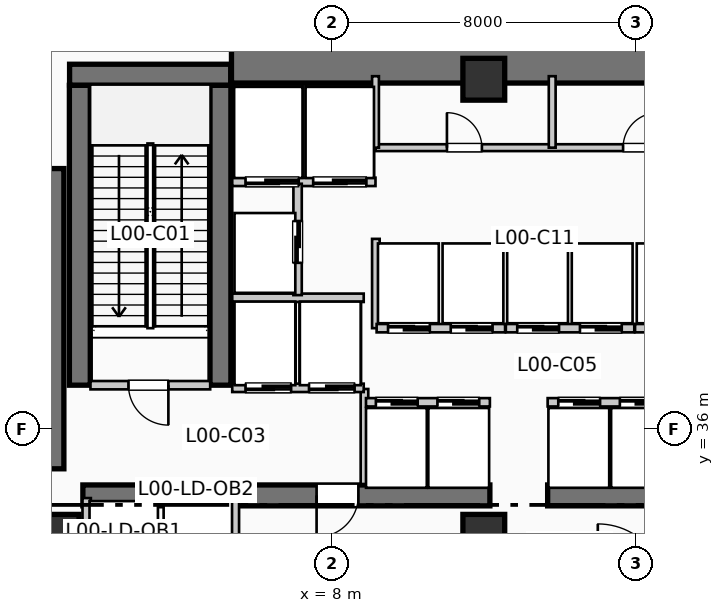
"""IFC4 building model, lengths in metres.
Left out: names, types, materials, properties, quantities, classifications, styles, units other than length and angle.
Written with IfcOpenShell. Run it as: python <this file> out.ifc"""

import sys

from ifc_helpers import new_model, si_unit, direction, frame, frame_2d, origin, origin_2d, place, context, subcontext, project, spatial, rectangle, extrude, element, fill, save


model = new_model("IFC4")
c1 = context("Model", 3, precision=1e-05, world=origin(), true_north=direction((0.0, 1.0)))
c2 = subcontext(c1, "Body", "Model", "MODEL_VIEW")
j1 = project(units=[si_unit("LENGTHUNIT", "METRE"), si_unit("PLANEANGLEUNIT", "RADIAN")], contexts=[c1])
p1 = place(None, origin())
s1 = spatial("IfcSite", under=j1, at=p1, CompositionType="ELEMENT")
p2 = place(p1, origin())
s2 = spatial("IfcBuilding", under=s1, at=p2, CompositionType="ELEMENT")
p3 = place(p2, origin())
s3 = spatial("IfcBuildingStorey", under=s2, at=p3, CompositionType="ELEMENT", Elevation=0.0)
p4 = place(p3, frame((5.36, 45.55, 0.0), z_axis=(0.0, 0.0, 1.0), x_axis=(1.0, 0.0, 0.0)))
e1 = element("IfcWall", 1, at=p4, inside=s3, PredefinedType="SHEAR", context=c2, shape_type="SweptSolid", body=[
    extrude(rectangle(XDim=13.98, YDim=0.9, at=frame_2d((6.99, 0.0))), origin(), (0.0, 0.0, 1.0), 5.94),
])
p5 = place(p3, frame((0.5, 34.95, 0.0), z_axis=(0.0, 0.0, 1.0), x_axis=(0.0, 1.0, 0.0)))
e2 = element("IfcWall", 2, at=p5, inside=s3, PredefinedType="SHEAR", context=c2, shape_type="SweptSolid", body=[
    extrude(rectangle(XDim=7.9, YDim=0.9, at=frame_2d((3.95, 0.0))), origin(), (0.0, 0.0, 1.0), 5.94),
])
p6 = place(p3, frame((1.45, 34.25, 0.0), z_axis=(0.0, 0.0, 1.0), x_axis=(1.0, 0.0, 0.0)))
e3 = element("IfcWall", 3, at=p6, inside=s3, PredefinedType="SHEAR", context=c2, shape_type="SweptSolid", body=[
    extrude(rectangle(XDim=10.71, YDim=0.55, at=frame_2d((5.355, 0.0))), origin(), (0.0, 0.0, 1.0), 5.94),
])
p7 = place(p6, frame((7.25, 0.0, 0.0), z_axis=(0.0, 0.0, 1.0), x_axis=(-1.0, 0.0, 0.0)))
e4 = element("IfcOpeningElement", 4, at=p7, cuts=e3, PredefinedType="OPENING", context=c2, shape_type="SweptSolid", body=[
    extrude(rectangle(XDim=1.1, YDim=2.15, at=frame_2d((0.55, 1.075))), frame((0.0, 0.285, 0.0), z_axis=(0.0, -1.0, 0.0), x_axis=(1.0, 0.0, 0.0)), (0.0, 0.0, 1.0), 0.57),
])
p8 = place(p3, frame((13.68, 34.25, 0.0), z_axis=(0.0, 0.0, 1.0), x_axis=(1.0, 0.0, 0.0)))
e5 = element("IfcWall", 5, at=p8, inside=s3, PredefinedType="SHEAR", context=c2, shape_type="SweptSolid", body=[
    extrude(rectangle(XDim=6.12, YDim=0.55, at=frame_2d((3.06, 0.0))), origin(), (0.0, 0.0, 1.0), 5.94),
])
for number, where, z_axis, x_axis in (
    (6, (1.37, 37.15, 0.0), (0.0, 0.0, 1.0), (0.0, 1.0, 0.0)),
    (7, (5.07, 37.15, 0.0), (0.0, 0.0, 1.0), (0.0, 1.0, 0.0)),
):
    element("IfcWall", number, at=place(p3, frame(where, z_axis=z_axis, x_axis=x_axis)), inside=s3, PredefinedType="SHEAR", context=c2, shape_type="SweptSolid", body=[
        extrude(rectangle(XDim=7.89, YDim=0.55, at=frame_2d((3.945, 0.0))), origin(), (0.0, 0.0, 1.0), 5.94),
    ])
p9 = place(p3, frame((1.1, 45.32, 0.0), z_axis=(0.0, 0.0, 1.0), x_axis=(1.0, 0.0, 0.0)))
e8 = element("IfcWall", 8, at=p9, inside=s3, PredefinedType="SHEAR", context=c2, shape_type="SweptSolid", body=[
    extrude(rectangle(XDim=4.24, YDim=0.55, at=frame_2d((2.12, 0.0))), origin(), (0.0, 0.0, 1.0), 5.94),
])
for number, where, z_axis, x_axis in (
    (9, (0.8, 33.2, 0.0), (0.0, 0.0, 1.0), (1.0, 0.0, 0.0)),
    (10, (12.0, 33.2, 0.0), (0.0, 0.0, 1.0), (1.0, 0.0, 0.0)),
    (11, (12.0, 45.2, 0.0), (0.0, 0.0, 1.0), (1.0, 0.0, 0.0)),
):
    element("IfcColumn", number, at=place(p3, frame(where, z_axis=z_axis, x_axis=x_axis)), inside=s3, PredefinedType="COLUMN", context=c2, shape_type="SweptSolid", body=[
        extrude(rectangle(XDim=1.1, YDim=1.1, at=origin_2d()), origin(), (0.0, 0.0, 1.0), 5.94),
    ])
p10 = place(p3, frame((1.088, 47.834, 0.0), z_axis=(0.0, 0.0, 1.0), x_axis=(-0.707106781187, -0.707106781187, 0.0)))
e12 = element("IfcWall", 12, at=p10, inside=s3, PredefinedType="SOLIDWALL", context=c2, shape_type="SweptSolid", body=[
    extrude(rectangle(XDim=4.133, YDim=0.36, at=frame_2d((2.066, 0.0))), origin(), (0.0, 0.0, 1.0), 5.62),
])
p11 = place(p3, frame((1.65, 37.15, 0.0), z_axis=(0.0, 0.0, 1.0), x_axis=(1.0, 0.0, 0.0)))
e13 = element("IfcWall", 13, at=p11, inside=s3, PredefinedType="PARTITIONING", context=c2, shape_type="SweptSolid", body=[
    extrude(rectangle(XDim=3.15, YDim=0.22, at=frame_2d((1.575, 0.0))), origin(), (0.0, 0.0, 1.0), 5.62),
])
p12 = place(p11, frame((2.05, 0.0, 0.0), z_axis=(0.0, 0.0, 1.0), x_axis=(-1.0, 0.0, 0.0)))
e14 = element("IfcOpeningElement", 14, at=p12, cuts=e13, PredefinedType="OPENING", context=c2, shape_type="SweptSolid", body=[
    extrude(rectangle(XDim=1.05, YDim=2.15, at=frame_2d((0.525, 1.075))), frame((0.0, 0.12, 0.0), z_axis=(0.0, -1.0, 0.0), x_axis=(1.0, 0.0, 0.0)), (0.0, 0.0, 1.0), 0.24),
])
p13 = place(p3, frame((8.86, 34.55, 0.0), z_axis=(0.0, 0.0, 1.0), x_axis=(0.0, 1.0, 0.0)))
e15 = element("IfcWall", 15, at=p13, inside=s3, PredefinedType="PARTITIONING", context=c2, shape_type="SweptSolid", body=[
    extrude(rectangle(XDim=2.5, YDim=0.2, at=frame_2d((1.25, 0.0))), origin(), (0.0, 0.0, 1.0), 5.62),
])
p14 = place(p3, frame((5.38, 37.08, 0.0), z_axis=(0.0, 0.0, 1.0), x_axis=(1.0, 0.0, 0.0)))
e16 = element("IfcWall", 16, at=p14, inside=s3, PredefinedType="PARTITIONING", context=c2, shape_type="SweptSolid", body=[
    extrude(rectangle(XDim=3.46, YDim=0.22, at=frame_2d((1.73, 0.0))), origin(), (0.0, 0.0, 1.0), 5.62),
])
p15 = place(p14, frame((1.55, 0.0, 0.0), z_axis=(0.0, 0.0, 1.0), x_axis=(-1.0, 0.0, 0.0)))
e17 = element("IfcOpeningElement", 17, at=p15, cuts=e16, PredefinedType="OPENING", context=c2, shape_type="SweptSolid", body=[
    extrude(rectangle(XDim=1.2, YDim=2.2, at=frame_2d((0.6, 1.1))), frame((0.0, 0.12, 0.0), z_axis=(0.0, -1.0, 0.0), x_axis=(1.0, 0.0, 0.0)), (0.0, 0.0, 1.0), 0.24),
])
p16 = place(p14, frame((3.22, 0.0, 0.0), z_axis=(0.0, 0.0, 1.0), x_axis=(-1.0, 0.0, 0.0)))
e18 = element("IfcOpeningElement", 18, at=p16, cuts=e16, PredefinedType="OPENING", context=c2, shape_type="SweptSolid", body=[
    extrude(rectangle(XDim=1.2, YDim=2.2, at=frame_2d((0.6, 1.1))), frame((0.0, 0.12, 0.0), z_axis=(0.0, -1.0, 0.0), x_axis=(1.0, 0.0, 0.0)), (0.0, 0.0, 1.0), 0.24),
])
p17 = place(p3, frame((5.38, 39.45, 0.0), z_axis=(0.0, 0.0, 1.0), x_axis=(1.0, 0.0, 0.0)))
e19 = element("IfcWall", 19, at=p17, inside=s3, PredefinedType="PARTITIONING", context=c2, shape_type="SweptSolid", body=[
    extrude(rectangle(XDim=3.46, YDim=0.22, at=frame_2d((1.73, 0.0))), origin(), (0.0, 0.0, 1.0), 5.62),
])
p18 = place(p3, frame((5.38, 42.5, 0.0), z_axis=(0.0, 0.0, 1.0), x_axis=(1.0, 0.0, 0.0)))
e20 = element("IfcWall", 20, at=p18, inside=s3, PredefinedType="PARTITIONING", context=c2, shape_type="SweptSolid", body=[
    extrude(rectangle(XDim=3.77, YDim=0.22, at=frame_2d((1.885, 0.0))), origin(), (0.0, 0.0, 1.0), 5.62),
])
p19 = place(p18, frame((1.75, 0.0, 0.0), z_axis=(0.0, 0.0, 1.0), x_axis=(-1.0, 0.0, 0.0)))
e21 = element("IfcOpeningElement", 21, at=p19, cuts=e20, PredefinedType="OPENING", context=c2, shape_type="SweptSolid", body=[
    extrude(rectangle(XDim=1.4, YDim=2.2, at=frame_2d((0.7, 1.1))), frame((0.0, 0.12, 0.0), z_axis=(0.0, -1.0, 0.0), x_axis=(1.0, 0.0, 0.0)), (0.0, 0.0, 1.0), 0.24),
])
p20 = place(p18, frame((3.53, 0.0, 0.0), z_axis=(0.0, 0.0, 1.0), x_axis=(-1.0, 0.0, 0.0)))
e22 = element("IfcOpeningElement", 22, at=p20, cuts=e20, PredefinedType="OPENING", context=c2, shape_type="SweptSolid", body=[
    extrude(rectangle(XDim=1.4, YDim=2.2, at=frame_2d((0.7, 1.1))), frame((0.0, 0.12, 0.0), z_axis=(0.0, -1.0, 0.0), x_axis=(1.0, 0.0, 0.0)), (0.0, 0.0, 1.0), 0.24),
])
p21 = place(p3, frame((7.1, 39.52, 0.0), z_axis=(0.0, 0.0, 1.0), x_axis=(0.0, 1.0, 0.0)))
e23 = element("IfcWall", 23, at=p21, inside=s3, PredefinedType="PARTITIONING", context=c2, shape_type="SweptSolid", body=[
    extrude(rectangle(XDim=2.93, YDim=0.22, at=frame_2d((1.465, 0.0))), origin(), (0.0, 0.0, 1.0), 5.62),
])
p22 = place(p21, frame((0.85, 0.0, 0.0)))
e24 = element("IfcOpeningElement", 24, at=p22, cuts=e23, PredefinedType="OPENING", context=c2, shape_type="SweptSolid", body=[
    extrude(rectangle(XDim=1.1, YDim=2.2, at=frame_2d((0.55, 1.1))), frame((0.0, 0.12, 0.0), z_axis=(0.0, -1.0, 0.0), x_axis=(1.0, 0.0, 0.0)), (0.0, 0.0, 1.0), 0.24),
])
for number, where, z_axis, x_axis in (
    (25, (1.55, 31.8, 0.0), (0.0, 0.0, 1.0), (0.0, 1.0, 0.0)),
    (26, (5.45, 31.8, 0.0), (0.0, 0.0, 1.0), (0.0, 1.0, 0.0)),
):
    element("IfcWall", number, at=place(p3, frame(where, z_axis=z_axis, x_axis=x_axis)), inside=s3, PredefinedType="PARTITIONING", context=c2, shape_type="SweptSolid", body=[
        extrude(rectangle(XDim=2.38, YDim=0.22, at=frame_2d((1.19, 0.0))), origin(), (0.0, 0.0, 1.0), 5.62),
    ])
p23 = place(p3, frame((9.16, 38.65, 0.0), z_axis=(0.0, 0.0, 1.0), x_axis=(0.0, 1.0, 0.0)))
e27 = element("IfcWall", 27, at=p23, inside=s3, PredefinedType="PARTITIONING", context=c2, shape_type="SweptSolid", body=[
    extrude(rectangle(XDim=2.35, YDim=0.2, at=frame_2d((1.175, 0.0))), origin(), (0.0, 0.0, 1.0), 5.62),
])
p24 = place(p3, frame((8.9, 36.7, 0.0), z_axis=(0.0, 0.0, 1.0), x_axis=(1.0, 0.0, 0.0)))
e28 = element("IfcWall", 28, at=p24, inside=s3, PredefinedType="PARTITIONING", context=c2, shape_type="SweptSolid", body=[
    extrude(rectangle(XDim=3.26, YDim=0.22, at=frame_2d((1.63, 0.0))), origin(), (0.0, 0.0, 1.0), 5.62),
])
p25 = place(p24, frame((0.26, 0.0, 0.0)))
e29 = element("IfcOpeningElement", 29, at=p25, cuts=e28, PredefinedType="OPENING", context=c2, shape_type="SweptSolid", body=[
    extrude(rectangle(XDim=1.1, YDim=2.2, at=frame_2d((0.55, 1.1))), frame((0.0, 0.12, 0.0), z_axis=(0.0, -1.0, 0.0), x_axis=(1.0, 0.0, 0.0)), (0.0, 0.0, 1.0), 0.24),
])
p26 = place(p24, frame((1.88, 0.0, 0.0)))
e30 = element("IfcOpeningElement", 30, at=p26, cuts=e28, PredefinedType="OPENING", context=c2, shape_type="SweptSolid", body=[
    extrude(rectangle(XDim=1.1, YDim=2.2, at=frame_2d((0.55, 1.1))), frame((0.0, 0.12, 0.0), z_axis=(0.0, -1.0, 0.0), x_axis=(1.0, 0.0, 0.0)), (0.0, 0.0, 1.0), 0.24),
])
p27 = place(p3, frame((9.18, 38.65, 0.0), z_axis=(0.0, 0.0, 1.0), x_axis=(1.0, 0.0, 0.0)))
e31 = element("IfcWall", 31, at=p27, inside=s3, PredefinedType="PARTITIONING", context=c2, shape_type="SweptSolid", body=[
    extrude(rectangle(XDim=3.38, YDim=0.22, at=frame_2d((1.69, 0.0))), origin(), (0.0, 0.0, 1.0), 5.62),
])
p28 = place(p27, frame((0.3, 0.0, 0.0)))
e32 = element("IfcOpeningElement", 32, at=p28, cuts=e31, PredefinedType="OPENING", context=c2, shape_type="SweptSolid", body=[
    extrude(rectangle(XDim=1.1, YDim=2.2, at=frame_2d((0.55, 1.1))), frame((0.0, 0.12, 0.0), z_axis=(0.0, -1.0, 0.0), x_axis=(1.0, 0.0, 0.0)), (0.0, 0.0, 1.0), 0.24),
])
p29 = place(p27, frame((1.95, 0.0, 0.0)))
e33 = element("IfcOpeningElement", 33, at=p29, cuts=e31, PredefinedType="OPENING", context=c2, shape_type="SweptSolid", body=[
    extrude(rectangle(XDim=1.1, YDim=2.2, at=frame_2d((0.55, 1.1))), frame((0.0, 0.12, 0.0), z_axis=(0.0, -1.0, 0.0), x_axis=(1.0, 0.0, 0.0)), (0.0, 0.0, 1.0), 0.24),
])
p30 = place(p3, frame((13.68, 36.7, 0.0), z_axis=(0.0, 0.0, 1.0), x_axis=(1.0, 0.0, 0.0)))
e34 = element("IfcWall", 34, at=p30, inside=s3, PredefinedType="PARTITIONING", context=c2, shape_type="SweptSolid", body=[
    extrude(rectangle(XDim=3.28, YDim=0.22, at=frame_2d((1.64, 0.0))), origin(), (0.0, 0.0, 1.0), 5.62),
])
p31 = place(p30, frame((0.28, 0.0, 0.0)))
e35 = element("IfcOpeningElement", 35, at=p31, cuts=e34, PredefinedType="OPENING", context=c2, shape_type="SweptSolid", body=[
    extrude(rectangle(XDim=1.1, YDim=2.2, at=frame_2d((0.55, 1.1))), frame((0.0, 0.12, 0.0), z_axis=(0.0, -1.0, 0.0), x_axis=(1.0, 0.0, 0.0)), (0.0, 0.0, 1.0), 0.24),
])
p32 = place(p30, frame((1.9, 0.0, 0.0)))
e36 = element("IfcOpeningElement", 36, at=p32, cuts=e34, PredefinedType="OPENING", context=c2, shape_type="SweptSolid", body=[
    extrude(rectangle(XDim=1.1, YDim=2.2, at=frame_2d((0.55, 1.1))), frame((0.0, 0.12, 0.0), z_axis=(0.0, -1.0, 0.0), x_axis=(1.0, 0.0, 0.0)), (0.0, 0.0, 1.0), 0.24),
])
p33 = place(p3, frame((12.58, 38.65, 0.0), z_axis=(0.0, 0.0, 1.0), x_axis=(1.0, 0.0, 0.0)))
e37 = element("IfcWall", 37, at=p33, inside=s3, PredefinedType="PARTITIONING", context=c2, shape_type="SweptSolid", body=[
    extrude(rectangle(XDim=3.38, YDim=0.22, at=frame_2d((1.69, 0.0))), origin(), (0.0, 0.0, 1.0), 5.62),
])
p34 = place(p33, frame((0.3, 0.0, 0.0)))
e38 = element("IfcOpeningElement", 38, at=p34, cuts=e37, PredefinedType="OPENING", context=c2, shape_type="SweptSolid", body=[
    extrude(rectangle(XDim=1.1, YDim=2.2, at=frame_2d((0.55, 1.1))), frame((0.0, 0.12, 0.0), z_axis=(0.0, -1.0, 0.0), x_axis=(1.0, 0.0, 0.0)), (0.0, 0.0, 1.0), 0.24),
])
p35 = place(p33, frame((1.95, 0.0, 0.0)))
e39 = element("IfcOpeningElement", 39, at=p35, cuts=e37, PredefinedType="OPENING", context=c2, shape_type="SweptSolid", body=[
    extrude(rectangle(XDim=1.1, YDim=2.2, at=frame_2d((0.55, 1.1))), frame((0.0, 0.12, 0.0), z_axis=(0.0, -1.0, 0.0), x_axis=(1.0, 0.0, 0.0)), (0.0, 0.0, 1.0), 0.24),
])
p36 = place(p3, frame((15.98, 38.65, 0.0), z_axis=(0.0, 0.0, 1.0), x_axis=(1.0, 0.0, 0.0)))
e40 = element("IfcWall", 40, at=p36, inside=s3, PredefinedType="PARTITIONING", context=c2, shape_type="SweptSolid", body=[
    extrude(rectangle(XDim=1.72, YDim=0.22, at=frame_2d((0.86, 0.0))), origin(), (0.0, 0.0, 1.0), 5.62),
])
p37 = place(p36, frame((0.3, 0.0, 0.0)))
e41 = element("IfcOpeningElement", 41, at=p37, cuts=e40, PredefinedType="OPENING", context=c2, shape_type="SweptSolid", body=[
    extrude(rectangle(XDim=1.1, YDim=2.2, at=frame_2d((0.55, 1.1))), frame((0.0, 0.12, 0.0), z_axis=(0.0, -1.0, 0.0), x_axis=(1.0, 0.0, 0.0)), (0.0, 0.0, 1.0), 0.24),
])
p38 = place(p3, frame((9.15, 43.4, 0.0), z_axis=(0.0, 0.0, 1.0), x_axis=(1.0, 0.0, 0.0)))
e42 = element("IfcWall", 42, at=p38, inside=s3, PredefinedType="PLUMBINGWALL", context=c2, shape_type="SweptSolid", body=[
    extrude(rectangle(XDim=9.33, YDim=0.18, at=frame_2d((4.665, 0.0))), origin(), (0.0, 0.0, 1.0), 5.62),
])
p39 = place(p38, frame((1.88, 0.0, 0.0)))
e43 = element("IfcOpeningElement", 43, at=p39, cuts=e42, PredefinedType="OPENING", context=c2, shape_type="SweptSolid", body=[
    extrude(rectangle(XDim=0.92, YDim=2.1, at=frame_2d((0.46, 1.05))), frame((0.0, 0.1, 0.0), z_axis=(0.0, -1.0, 0.0), x_axis=(1.0, 0.0, 0.0)), (0.0, 0.0, 1.0), 0.2),
])
p40 = place(p38, frame((6.515, 0.0, 0.0)))
e44 = element("IfcOpeningElement", 44, at=p40, cuts=e42, PredefinedType="OPENING", context=c2, shape_type="SweptSolid", body=[
    extrude(rectangle(XDim=0.92, YDim=2.1, at=frame_2d((0.46, 1.05))), frame((0.0, 0.1, 0.0), z_axis=(0.0, -1.0, 0.0), x_axis=(1.0, 0.0, 0.0)), (0.0, 0.0, 1.0), 0.2),
])
for number, where, z_axis, x_axis in (
    (45, (9.15, 43.4, 0.0), (0.0, 0.0, 1.0), (0.0, 1.0, 0.0)),
    (46, (13.8, 43.4, 0.0), (0.0, 0.0, 1.0), (0.0, 1.0, 0.0)),
):
    element("IfcWall", number, at=place(p3, frame(where, z_axis=z_axis, x_axis=x_axis)), inside=s3, PredefinedType="PLUMBINGWALL", context=c2, shape_type="SweptSolid", body=[
        extrude(rectangle(XDim=1.88, YDim=0.18, at=frame_2d((0.94, 0.0))), origin(), (0.0, 0.0, 1.0), 5.62),
    ])
p41 = place(p12, origin())
e47 = element("IfcDoor", 47, at=p41, inside=s3, OperationType="SINGLE_SWING_RIGHT", PredefinedType="DOOR", context=c2, shape_type="SweptSolid", body=[
    extrude(rectangle(XDim=1.05, YDim=2.15, at=frame_2d((0.525, 1.075))), frame((0.0, 0.025, 0.0), z_axis=(0.0, -1.0, 0.0), x_axis=(1.0, 0.0, 0.0)), (0.0, 0.0, 1.0), 0.05),
])
fill(e14, e47)
p42 = place(p7, origin())
e48 = element("IfcDoor", 48, at=p42, inside=s3, OperationType="SINGLE_SWING_LEFT", PredefinedType="DOOR", context=c2, shape_type="SweptSolid", body=[
    extrude(rectangle(XDim=1.1, YDim=2.15, at=frame_2d((0.55, 1.075))), frame((0.0, 0.025, 0.0), z_axis=(0.0, -1.0, 0.0), x_axis=(1.0, 0.0, 0.0)), (0.0, 0.0, 1.0), 0.05),
])
fill(e4, e48)
p43 = place(p15, origin())
e49 = element("IfcDoor", 49, at=p43, inside=s3, OperationType="SLIDING_TO_RIGHT", PredefinedType="DOOR", context=c2, shape_type="SweptSolid", body=[
    extrude(rectangle(XDim=1.2, YDim=2.2, at=frame_2d((0.6, 1.1))), frame((0.0, 0.025, 0.0), z_axis=(0.0, -1.0, 0.0), x_axis=(1.0, 0.0, 0.0)), (0.0, 0.0, 1.0), 0.05),
])
fill(e17, e49)
p44 = place(p16, origin())
e50 = element("IfcDoor", 50, at=p44, inside=s3, OperationType="SLIDING_TO_RIGHT", PredefinedType="DOOR", context=c2, shape_type="SweptSolid", body=[
    extrude(rectangle(XDim=1.2, YDim=2.2, at=frame_2d((0.6, 1.1))), frame((0.0, 0.025, 0.0), z_axis=(0.0, -1.0, 0.0), x_axis=(1.0, 0.0, 0.0)), (0.0, 0.0, 1.0), 0.05),
])
fill(e18, e50)
p45 = place(p19, origin())
e51 = element("IfcDoor", 51, at=p45, inside=s3, OperationType="SLIDING_TO_LEFT", PredefinedType="DOOR", context=c2, shape_type="SweptSolid", body=[
    extrude(rectangle(XDim=1.4, YDim=2.2, at=frame_2d((0.7, 1.1))), frame((0.0, 0.025, 0.0), z_axis=(0.0, -1.0, 0.0), x_axis=(1.0, 0.0, 0.0)), (0.0, 0.0, 1.0), 0.05),
])
fill(e21, e51)
p46 = place(p20, origin())
e52 = element("IfcDoor", 52, at=p46, inside=s3, OperationType="SLIDING_TO_LEFT", PredefinedType="DOOR", context=c2, shape_type="SweptSolid", body=[
    extrude(rectangle(XDim=1.4, YDim=2.2, at=frame_2d((0.7, 1.1))), frame((0.0, 0.025, 0.0), z_axis=(0.0, -1.0, 0.0), x_axis=(1.0, 0.0, 0.0)), (0.0, 0.0, 1.0), 0.05),
])
fill(e22, e52)
p47 = place(p22, origin())
e53 = element("IfcDoor", 53, at=p47, inside=s3, OperationType="SLIDING_TO_LEFT", PredefinedType="DOOR", context=c2, shape_type="SweptSolid", body=[
    extrude(rectangle(XDim=1.1, YDim=2.2, at=frame_2d((0.55, 1.1))), frame((0.0, 0.025, 0.0), z_axis=(0.0, -1.0, 0.0), x_axis=(1.0, 0.0, 0.0)), (0.0, 0.0, 1.0), 0.05),
])
fill(e24, e53)
p48 = place(p25, origin())
e54 = element("IfcDoor", 54, at=p48, inside=s3, OperationType="SLIDING_TO_LEFT", PredefinedType="DOOR", context=c2, shape_type="SweptSolid", body=[
    extrude(rectangle(XDim=1.1, YDim=2.2, at=frame_2d((0.55, 1.1))), frame((0.0, 0.025, 0.0), z_axis=(0.0, -1.0, 0.0), x_axis=(1.0, 0.0, 0.0)), (0.0, 0.0, 1.0), 0.05),
])
fill(e29, e54)
p49 = place(p26, origin())
e55 = element("IfcDoor", 55, at=p49, inside=s3, OperationType="SLIDING_TO_LEFT", PredefinedType="DOOR", context=c2, shape_type="SweptSolid", body=[
    extrude(rectangle(XDim=1.1, YDim=2.2, at=frame_2d((0.55, 1.1))), frame((0.0, 0.025, 0.0), z_axis=(0.0, -1.0, 0.0), x_axis=(1.0, 0.0, 0.0)), (0.0, 0.0, 1.0), 0.05),
])
fill(e30, e55)
p50 = place(p28, origin())
e56 = element("IfcDoor", 56, at=p50, inside=s3, OperationType="SLIDING_TO_LEFT", PredefinedType="DOOR", context=c2, shape_type="SweptSolid", body=[
    extrude(rectangle(XDim=1.1, YDim=2.2, at=frame_2d((0.55, 1.1))), frame((0.0, 0.025, 0.0), z_axis=(0.0, -1.0, 0.0), x_axis=(1.0, 0.0, 0.0)), (0.0, 0.0, 1.0), 0.05),
])
fill(e32, e56)
p51 = place(p29, origin())
e57 = element("IfcDoor", 57, at=p51, inside=s3, OperationType="SLIDING_TO_LEFT", PredefinedType="DOOR", context=c2, shape_type="SweptSolid", body=[
    extrude(rectangle(XDim=1.1, YDim=2.2, at=frame_2d((0.55, 1.1))), frame((0.0, 0.025, 0.0), z_axis=(0.0, -1.0, 0.0), x_axis=(1.0, 0.0, 0.0)), (0.0, 0.0, 1.0), 0.05),
])
fill(e33, e57)
p52 = place(p31, origin())
e58 = element("IfcDoor", 58, at=p52, inside=s3, OperationType="SLIDING_TO_RIGHT", PredefinedType="DOOR", context=c2, shape_type="SweptSolid", body=[
    extrude(rectangle(XDim=1.1, YDim=2.2, at=frame_2d((0.55, 1.1))), frame((0.0, 0.025, 0.0), z_axis=(0.0, -1.0, 0.0), x_axis=(1.0, 0.0, 0.0)), (0.0, 0.0, 1.0), 0.05),
])
fill(e35, e58)
p53 = place(p32, origin())
e59 = element("IfcDoor", 59, at=p53, inside=s3, OperationType="SLIDING_TO_RIGHT", PredefinedType="DOOR", context=c2, shape_type="SweptSolid", body=[
    extrude(rectangle(XDim=1.1, YDim=2.2, at=frame_2d((0.55, 1.1))), frame((0.0, 0.025, 0.0), z_axis=(0.0, -1.0, 0.0), x_axis=(1.0, 0.0, 0.0)), (0.0, 0.0, 1.0), 0.05),
])
fill(e36, e59)
p54 = place(p34, origin())
e60 = element("IfcDoor", 60, at=p54, inside=s3, OperationType="SLIDING_TO_RIGHT", PredefinedType="DOOR", context=c2, shape_type="SweptSolid", body=[
    extrude(rectangle(XDim=1.1, YDim=2.2, at=frame_2d((0.55, 1.1))), frame((0.0, 0.025, 0.0), z_axis=(0.0, -1.0, 0.0), x_axis=(1.0, 0.0, 0.0)), (0.0, 0.0, 1.0), 0.05),
])
fill(e38, e60)
p55 = place(p35, origin())
e61 = element("IfcDoor", 61, at=p55, inside=s3, OperationType="SLIDING_TO_RIGHT", PredefinedType="DOOR", context=c2, shape_type="SweptSolid", body=[
    extrude(rectangle(XDim=1.1, YDim=2.2, at=frame_2d((0.55, 1.1))), frame((0.0, 0.025, 0.0), z_axis=(0.0, -1.0, 0.0), x_axis=(1.0, 0.0, 0.0)), (0.0, 0.0, 1.0), 0.05),
])
fill(e39, e61)
p56 = place(p39, origin())
e62 = element("IfcDoor", 62, at=p56, inside=s3, OperationType="SINGLE_SWING_LEFT", PredefinedType="DOOR", context=c2, shape_type="SweptSolid", body=[
    extrude(rectangle(XDim=0.92, YDim=2.1, at=frame_2d((0.46, 1.05))), frame((0.0, 0.025, 0.0), z_axis=(0.0, -1.0, 0.0), x_axis=(1.0, 0.0, 0.0)), (0.0, 0.0, 1.0), 0.05),
])
fill(e43, e62)
p57 = place(p40, origin())
e63 = element("IfcDoor", 63, at=p57, inside=s3, OperationType="SINGLE_SWING_RIGHT", PredefinedType="DOOR", context=c2, shape_type="SweptSolid", body=[
    extrude(rectangle(XDim=0.92, YDim=2.1, at=frame_2d((0.46, 1.05))), frame((0.0, 0.025, 0.0), z_axis=(0.0, -1.0, 0.0), x_axis=(1.0, 0.0, 0.0)), (0.0, 0.0, 1.0), 0.05),
])
fill(e44, e63)
save(model, sys.argv[1])
